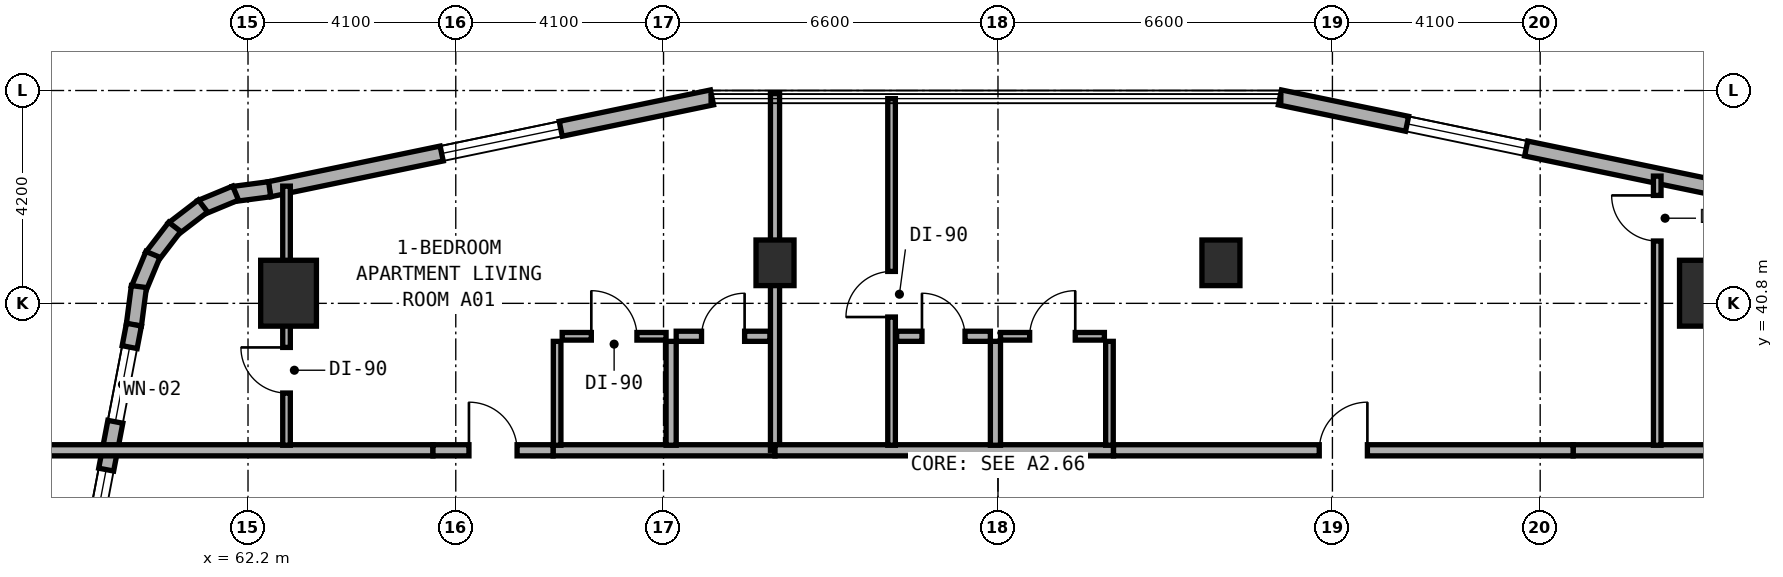
"""IFC4 building model, lengths in metres.
Left out: names, types, materials, properties, quantities, classifications, styles, units other than length and angle.
Written with IfcOpenShell. Run it as: python <this file> out.ifc"""

import sys

from ifc_helpers import new_model, si_unit, direction, frame, frame_2d, origin, origin_2d, place, context, subcontext, project, spatial, rectangle, extrude, element, fill, save


model = new_model("IFC4")
c1 = context("Model", 3, precision=1e-05, world=origin(), true_north=direction((0.0, 1.0)))
c2 = subcontext(c1, "Body", "Model", "MODEL_VIEW")
j1 = project(units=[si_unit("LENGTHUNIT", "METRE"), si_unit("PLANEANGLEUNIT", "RADIAN")], contexts=[c1])
p1 = place(None, origin())
s1 = spatial("IfcSite", under=j1, at=p1, CompositionType="ELEMENT")
p2 = place(p1, origin())
s2 = spatial("IfcBuilding", under=s1, at=p2, CompositionType="ELEMENT")
p3 = place(p2, frame((0.0, 0.0, 24.0)))
s3 = spatial("IfcBuildingStorey", under=s2, at=p3, CompositionType="ELEMENT", Elevation=24.0)
for number, where, z_axis, x_axis in (
    (1, (72.6, 41.6, 0.0), (0.0, 0.0, 1.0), (1.0, 0.0, 0.0)),
    (2, (81.4, 41.6, 0.0), (0.0, 0.0, 1.0), (1.0, 0.0, 0.0)),
):
    element("IfcColumn", number, at=place(p3, frame(where, z_axis=z_axis, x_axis=x_axis)), inside=s3, PredefinedType="COLUMN", context=c2, shape_type="SweptSolid", body=[
        extrude(rectangle(XDim=0.75, YDim=0.9, at=origin_2d()), origin(), (0.0, 0.0, 1.0), 3.5),
    ])
for number, where, z_axis, x_axis in (
    (3, (91.0, 41.0, 0.0), (0.0, 0.0, 1.0), (1.0, 0.0, 0.0)),
    (4, (63.0, 41.0, 0.0), (0.0, 0.0, 1.0), (1.0, 0.0, 0.0)),
):
    element("IfcColumn", number, at=place(p3, frame(where, z_axis=z_axis, x_axis=x_axis)), inside=s3, PredefinedType="COLUMN", context=c2, shape_type="SweptSolid", body=[
        extrude(rectangle(XDim=1.1, YDim=1.3, at=origin_2d()), origin(), (0.0, 0.0, 1.0), 3.5),
    ])
p4 = place(p3, frame((91.298, 43.051, 0.0), z_axis=(0.0, 0.0, 1.0), x_axis=(-0.979128391325, 0.203242695569, 0.0)))
e5 = element("IfcWall", 5, at=p4, inside=s3, PredefinedType="STANDARD", context=c2, shape_type="SweptSolid", body=[
    extrude(rectangle(XDim=8.92, YDim=0.3, at=frame_2d((4.46, 0.0))), origin(), (0.0, 0.0, 1.0), 3.25),
])
p5 = place(p4, frame((3.957, 0.0, 0.8)))
e6 = element("IfcOpeningElement", 6, at=p5, cuts=e5, PredefinedType="OPENING", context=c2, shape_type="SweptSolid", body=[
    extrude(rectangle(XDim=2.4, YDim=1.6, at=frame_2d((1.2, 0.8))), frame((0.0, 0.16, 0.0), z_axis=(0.0, -1.0, 0.0), x_axis=(1.0, 0.0, 0.0)), (0.0, 0.0, 1.0), 0.32),
])
p6 = place(p3, frame((71.356, 44.864, 0.0), z_axis=(0.0, 0.0, 1.0), x_axis=(-0.979127260729, -0.203248142175, 0.0)))
e7 = element("IfcWall", 7, at=p6, inside=s3, PredefinedType="STANDARD", context=c2, shape_type="SweptSolid", body=[
    extrude(rectangle(XDim=8.92, YDim=0.3, at=frame_2d((4.46, 0.0))), origin(), (0.0, 0.0, 1.0), 3.25),
])
p7 = place(p6, frame((3.048, 0.0, 0.8)))
e8 = element("IfcOpeningElement", 8, at=p7, cuts=e7, PredefinedType="OPENING", context=c2, shape_type="SweptSolid", body=[
    extrude(rectangle(XDim=2.4, YDim=1.6, at=frame_2d((1.2, 0.8))), frame((0.0, 0.16, 0.0), z_axis=(0.0, -1.0, 0.0), x_axis=(1.0, 0.0, 0.0)), (0.0, 0.0, 1.0), 0.32),
])
p8 = place(p3, frame((62.627, 43.052, 0.0), z_axis=(0.0, 0.0, 1.0), x_axis=(-0.991480488834, -0.130255288807, 0.0)))
e9 = element("IfcWall", 9, at=p8, inside=s3, PredefinedType="STANDARD", context=c2, shape_type="SweptSolid", body=[
    extrude(rectangle(XDim=0.729, YDim=0.3, at=frame_2d((0.365, 0.0))), origin(), (0.0, 0.0, 1.0), 3.25),
])
for number, where, z_axis, x_axis in (
    (10, (61.955, 42.976, 0.0), (0.0, 0.0, 1.0), (-0.924, -0.384, 0.0)),
    (11, (61.311, 42.721, 0.0), (0.0, 0.0, 1.0), (-0.794, -0.608, 0.0)),
    (12, (60.754, 42.309, 0.0), (0.0, 0.0, 1.0), (-0.608, -0.794, 0.0)),
    (13, (60.324, 41.766, 0.0), (0.0, 0.0, 1.0), (-0.383, -0.924, 0.0)),
):
    element("IfcWall", number, at=place(p3, frame(where, z_axis=z_axis, x_axis=x_axis)), inside=s3, PredefinedType="STANDARD", context=c2, shape_type="SweptSolid", body=[
        extrude(rectangle(XDim=0.746, YDim=0.3, at=frame_2d((0.373, 0.0))), origin(), (0.0, 0.0, 1.0), 3.25),
    ])
p9 = place(p3, frame((60.047, 41.131, 0.0), z_axis=(0.0, 0.0, 1.0), x_axis=(-0.129653178221, -0.991559404866, 0.0)))
e14 = element("IfcWall", 14, at=p9, inside=s3, PredefinedType="STANDARD", context=c2, shape_type="SweptSolid", body=[
    extrude(rectangle(XDim=0.764, YDim=0.3, at=frame_2d((0.382, 0.0))), origin(), (0.0, 0.0, 1.0), 3.25),
])
p10 = place(p3, frame((59.949, 40.38, 0.0), z_axis=(0.0, 0.0, 1.0), x_axis=(-0.188087874316, -0.982152203854, 0.0)))
e15 = element("IfcWall", 15, at=p10, inside=s3, PredefinedType="STANDARD", context=c2, shape_type="SweptSolid", body=[
    extrude(rectangle(XDim=9.634, YDim=0.3, at=frame_2d((4.817, 0.0))), origin(), (0.0, 0.0, 1.0), 3.25),
])
p11 = place(p10, frame((0.452, 0.0, 0.85)))
e16 = element("IfcOpeningElement", 16, at=p11, cuts=e15, PredefinedType="OPENING", context=c2, shape_type="SweptSolid", body=[
    extrude(rectangle(XDim=1.5, YDim=1.5, at=frame_2d((0.75, 0.75))), frame((0.0, 0.16, 0.0), z_axis=(0.0, -1.0, 0.0), x_axis=(1.0, 0.0, 0.0)), (0.0, 0.0, 1.0), 0.32),
])
p12 = place(p10, frame((2.913, 0.0, 0.85)))
e17 = element("IfcOpeningElement", 17, at=p12, cuts=e15, PredefinedType="OPENING", context=c2, shape_type="SweptSolid", body=[
    extrude(rectangle(XDim=1.2, YDim=1.5, at=frame_2d((0.6, 0.75))), frame((0.0, 0.16, 0.0), z_axis=(0.0, -1.0, 0.0), x_axis=(1.0, 0.0, 0.0)), (0.0, 0.0, 1.0), 0.32),
])
p13 = place(p10, frame((5.235, 0.0, 0.8)))
e18 = element("IfcOpeningElement", 18, at=p13, cuts=e15, PredefinedType="OPENING", context=c2, shape_type="SweptSolid", body=[
    extrude(rectangle(XDim=2.4, YDim=1.6, at=frame_2d((1.2, 0.8))), frame((0.0, 0.16, 0.0), z_axis=(0.0, -1.0, 0.0), x_axis=(1.0, 0.0, 0.0)), (0.0, 0.0, 1.0), 0.32),
])
p14 = place(p3, frame((58.16, 37.9, 0.0), z_axis=(0.0, 0.0, 1.0), x_axis=(1.0, 0.0, 0.0)))
e19 = element("IfcWall", 19, at=p14, inside=s3, PredefinedType="SOLIDWALL", context=c2, shape_type="SweptSolid", body=[
    extrude(rectangle(XDim=7.69, YDim=0.22, at=frame_2d((3.845, 0.0))), origin(), (0.0, 0.0, 1.0), 2.865),
])
p15 = place(p3, frame((68.22, 37.9, 0.0), z_axis=(0.0, 0.0, 1.0), x_axis=(1.0, 0.0, 0.0)))
e20 = element("IfcWall", 20, at=p15, inside=s3, PredefinedType="SOLIDWALL", context=c2, shape_type="SweptSolid", body=[
    extrude(rectangle(XDim=4.38, YDim=0.22, at=frame_2d((2.19, 0.0))), origin(), (0.0, 0.0, 1.0), 2.725),
])
p16 = place(p3, frame((65.85, 37.9, 0.0), z_axis=(0.0, 0.0, 1.0), x_axis=(1.0, 0.0, 0.0)))
e21 = element("IfcWall", 21, at=p16, inside=s3, PredefinedType="SOLIDWALL", context=c2, shape_type="SweptSolid", body=[
    extrude(rectangle(XDim=2.37, YDim=0.22, at=frame_2d((1.185, 0.0))), origin(), (0.0, 0.0, 1.0), 3.22),
])
p17 = place(p16, frame((0.71, 0.0, 0.0)))
e22 = element("IfcOpeningElement", 22, at=p17, cuts=e21, PredefinedType="OPENING", context=c2, shape_type="SweptSolid", body=[
    extrude(rectangle(XDim=0.95, YDim=2.1, at=frame_2d((0.475, 1.05))), frame((0.0, 0.12, 0.0), z_axis=(0.0, -1.0, 0.0), x_axis=(1.0, 0.0, 0.0)), (0.0, 0.0, 1.0), 0.24),
])
p18 = place(p3, frame((62.96, 38.0, 0.0), z_axis=(0.0, 0.0, 1.0), x_axis=(0.0, 1.0, 0.0)))
e23 = element("IfcWall", 23, at=p18, inside=s3, PredefinedType="PARTITIONING", context=c2, shape_type="SweptSolid", body=[
    extrude(rectangle(XDim=5.113, YDim=0.15, at=frame_2d((2.557, 0.0))), origin(), (0.0, 0.0, 1.0), 2.865),
])
p19 = place(p18, frame((1.03, 0.0, 0.0)))
e24 = element("IfcOpeningElement", 24, at=p19, cuts=e23, PredefinedType="OPENING", context=c2, shape_type="SweptSolid", body=[
    extrude(rectangle(XDim=0.9, YDim=2.1, at=frame_2d((0.45, 1.05))), frame((0.0, 0.085, 0.0), z_axis=(0.0, -1.0, 0.0), x_axis=(1.0, 0.0, 0.0)), (0.0, 0.0, 1.0), 0.17),
])
p20 = place(p3, frame((70.55, 38.0, 0.0), z_axis=(0.0, 0.0, 1.0), x_axis=(0.0, 1.0, 0.0)))
e25 = element("IfcWall", 25, at=p20, inside=s3, PredefinedType="PLUMBINGWALL", context=c2, shape_type="SweptSolid", body=[
    extrude(rectangle(XDim=2.05, YDim=0.2, at=frame_2d((1.025, 0.0))), origin(), (0.0, 0.0, 1.0), 3.22),
])
p21 = place(p3, frame((68.3, 38.0, 0.0), z_axis=(0.0, 0.0, 1.0), x_axis=(0.0, 1.0, 0.0)))
e26 = element("IfcWall", 26, at=p21, inside=s3, PredefinedType="PARTITIONING", context=c2, shape_type="SweptSolid", body=[
    extrude(rectangle(XDim=2.05, YDim=0.15, at=frame_2d((1.025, 0.0))), origin(), (0.0, 0.0, 1.0), 3.22),
])
p22 = place(p3, frame((70.65, 40.15, 0.0), z_axis=(0.0, 0.0, 1.0), x_axis=(1.0, 0.0, 0.0)))
e27 = element("IfcWall", 27, at=p22, inside=s3, PredefinedType="PLUMBINGWALL", context=c2, shape_type="SweptSolid", body=[
    extrude(rectangle(XDim=1.85, YDim=0.2, at=frame_2d((0.925, 0.0))), origin(), (0.0, 0.0, 1.0), 3.22),
])
p23 = place(p22, frame((0.5, 0.0, 0.0)))
e28 = element("IfcOpeningElement", 28, at=p23, cuts=e27, PredefinedType="OPENING", context=c2, shape_type="SweptSolid", body=[
    extrude(rectangle(XDim=0.85, YDim=2.1, at=frame_2d((0.425, 1.05))), frame((0.0, 0.11, 0.0), z_axis=(0.0, -1.0, 0.0), x_axis=(1.0, 0.0, 0.0)), (0.0, 0.0, 1.0), 0.22),
])
p24 = place(p3, frame((68.4, 40.15, 0.0), z_axis=(0.0, 0.0, 1.0), x_axis=(1.0, 0.0, 0.0)))
e29 = element("IfcWall", 29, at=p24, inside=s3, PredefinedType="PARTITIONING", context=c2, shape_type="SweptSolid", body=[
    extrude(rectangle(XDim=2.05, YDim=0.15, at=frame_2d((1.025, 0.0))), origin(), (0.0, 0.0, 1.0), 3.22),
])
p25 = place(p24, frame((0.575, 0.0, 0.0)))
e30 = element("IfcOpeningElement", 30, at=p25, cuts=e29, PredefinedType="OPENING", context=c2, shape_type="SweptSolid", body=[
    extrude(rectangle(XDim=0.9, YDim=2.1, at=frame_2d((0.45, 1.05))), frame((0.0, 0.085, 0.0), z_axis=(0.0, -1.0, 0.0), x_axis=(1.0, 0.0, 0.0)), (0.0, 0.0, 1.0), 0.17),
])
p26 = place(p3, frame((72.6, 37.9, 0.0), z_axis=(0.0, 0.0, 1.0), x_axis=(0.0, 1.0, 0.0)))
e31 = element("IfcWall", 31, at=p26, inside=s3, PredefinedType="SOLIDWALL", context=c2, shape_type="SweptSolid", body=[
    extrude(rectangle(XDim=7.04, YDim=0.18, at=frame_2d((3.52, 0.0))), origin(), (0.0, 0.0, 1.0), 2.725),
])
p27 = place(p3, frame((72.6, 37.9, 0.0), z_axis=(0.0, 0.0, 1.0), x_axis=(1.0, 0.0, 0.0)))
e32 = element("IfcWall", 32, at=p27, inside=s3, PredefinedType="SOLIDWALL", context=c2, shape_type="SweptSolid", body=[
    extrude(rectangle(XDim=6.68, YDim=0.22, at=frame_2d((3.34, 0.0))), origin(), (0.0, 0.0, 1.0), 2.725),
])
p28 = place(p3, frame((88.35, 37.9, 0.0), z_axis=(0.0, 0.0, 1.0), x_axis=(1.0, 0.0, 0.0)))
e33 = element("IfcWall", 33, at=p28, inside=s3, PredefinedType="SOLIDWALL", context=c2, shape_type="SweptSolid", body=[
    extrude(rectangle(XDim=7.41, YDim=0.22, at=frame_2d((3.705, 0.0))), origin(), (0.0, 0.0, 1.0), 2.865),
])
p29 = place(p3, frame((79.28, 37.9, 0.0), z_axis=(0.0, 0.0, 1.0), x_axis=(1.0, 0.0, 0.0)))
e34 = element("IfcWall", 34, at=p29, inside=s3, PredefinedType="SOLIDWALL", context=c2, shape_type="SweptSolid", body=[
    extrude(rectangle(XDim=9.07, YDim=0.22, at=frame_2d((4.535, 0.0))), origin(), (0.0, 0.0, 1.0), 2.725),
])
p30 = place(p29, frame((4.06, 0.0, 0.0)))
e35 = element("IfcOpeningElement", 35, at=p30, cuts=e34, PredefinedType="OPENING", context=c2, shape_type="SweptSolid", body=[
    extrude(rectangle(XDim=0.95, YDim=2.1, at=frame_2d((0.475, 1.05))), frame((0.0, 0.12, 0.0), z_axis=(0.0, -1.0, 0.0), x_axis=(1.0, 0.0, 0.0)), (0.0, 0.0, 1.0), 0.24),
])
p31 = place(p3, frame((74.9, 38.0, 0.0), z_axis=(0.0, 0.0, 1.0), x_axis=(0.0, 1.0, 0.0)))
e36 = element("IfcWall", 36, at=p31, inside=s3, PredefinedType="PARTITIONING", context=c2, shape_type="SweptSolid", body=[
    extrude(rectangle(XDim=6.84, YDim=0.15, at=frame_2d((3.42, 0.0))), origin(), (0.0, 0.0, 1.0), 2.865),
])
p32 = place(p31, frame((2.53, 0.0, 0.0)))
e37 = element("IfcOpeningElement", 37, at=p32, cuts=e36, PredefinedType="OPENING", context=c2, shape_type="SweptSolid", body=[
    extrude(rectangle(XDim=0.9, YDim=2.1, at=frame_2d((0.45, 1.05))), frame((0.0, 0.085, 0.0), z_axis=(0.0, -1.0, 0.0), x_axis=(1.0, 0.0, 0.0)), (0.0, 0.0, 1.0), 0.17),
])
p33 = place(p3, frame((90.01, 38.0, 0.0), z_axis=(0.0, 0.0, 1.0), x_axis=(0.0, 1.0, 0.0)))
e38 = element("IfcWall", 38, at=p33, inside=s3, PredefinedType="PARTITIONING", context=c2, shape_type="SweptSolid", body=[
    extrude(rectangle(XDim=5.311, YDim=0.15, at=frame_2d((2.656, 0.0))), origin(), (0.0, 0.0, 1.0), 2.865),
])
p34 = place(p33, frame((4.03, 0.0, 0.0)))
e39 = element("IfcOpeningElement", 39, at=p34, cuts=e38, PredefinedType="OPENING", context=c2, shape_type="SweptSolid", body=[
    extrude(rectangle(XDim=0.9, YDim=2.1, at=frame_2d((0.45, 1.05))), frame((0.0, 0.085, 0.0), z_axis=(0.0, -1.0, 0.0), x_axis=(1.0, 0.0, 0.0)), (0.0, 0.0, 1.0), 0.17),
])
p35 = place(p3, frame((76.95, 38.0, 0.0), z_axis=(0.0, 0.0, 1.0), x_axis=(0.0, 1.0, 0.0)))
e40 = element("IfcWall", 40, at=p35, inside=s3, PredefinedType="PLUMBINGWALL", context=c2, shape_type="SweptSolid", body=[
    extrude(rectangle(XDim=2.05, YDim=0.2, at=frame_2d((1.025, 0.0))), origin(), (0.0, 0.0, 1.0), 2.985),
])
p36 = place(p3, frame((79.2, 38.0, 0.0), z_axis=(0.0, 0.0, 1.0), x_axis=(0.0, 1.0, 0.0)))
e41 = element("IfcWall", 41, at=p36, inside=s3, PredefinedType="PARTITIONING", context=c2, shape_type="SweptSolid", body=[
    extrude(rectangle(XDim=2.05, YDim=0.15, at=frame_2d((1.025, 0.0))), origin(), (0.0, 0.0, 1.0), 2.985),
])
p37 = place(p3, frame((75.0, 40.15, 0.0), z_axis=(0.0, 0.0, 1.0), x_axis=(1.0, 0.0, 0.0)))
e42 = element("IfcWall", 42, at=p37, inside=s3, PredefinedType="PLUMBINGWALL", context=c2, shape_type="SweptSolid", body=[
    extrude(rectangle(XDim=1.85, YDim=0.2, at=frame_2d((0.925, 0.0))), origin(), (0.0, 0.0, 1.0), 3.22),
])
p38 = place(p37, frame((0.5, 0.0, 0.0)))
e43 = element("IfcOpeningElement", 43, at=p38, cuts=e42, PredefinedType="OPENING", context=c2, shape_type="SweptSolid", body=[
    extrude(rectangle(XDim=0.85, YDim=2.1, at=frame_2d((0.425, 1.05))), frame((0.0, 0.11, 0.0), z_axis=(0.0, -1.0, 0.0), x_axis=(1.0, 0.0, 0.0)), (0.0, 0.0, 1.0), 0.22),
])
p39 = place(p3, frame((77.05, 40.15, 0.0), z_axis=(0.0, 0.0, 1.0), x_axis=(1.0, 0.0, 0.0)))
e44 = element("IfcWall", 44, at=p39, inside=s3, PredefinedType="PARTITIONING", context=c2, shape_type="SweptSolid", body=[
    extrude(rectangle(XDim=2.05, YDim=0.15, at=frame_2d((1.025, 0.0))), origin(), (0.0, 0.0, 1.0), 3.22),
])
p40 = place(p39, frame((0.575, 0.0, 0.0)))
e45 = element("IfcOpeningElement", 45, at=p40, cuts=e44, PredefinedType="OPENING", context=c2, shape_type="SweptSolid", body=[
    extrude(rectangle(XDim=0.9, YDim=2.1, at=frame_2d((0.45, 1.05))), frame((0.0, 0.085, 0.0), z_axis=(0.0, -1.0, 0.0), x_axis=(1.0, 0.0, 0.0)), (0.0, 0.0, 1.0), 0.17),
])
p41 = place(p5, origin())
e46 = element("IfcWindow", 46, at=p41, inside=s3, PartitioningType="SINGLE_PANEL", PredefinedType="WINDOW", context=c2, shape_type="SweptSolid", body=[
    extrude(rectangle(XDim=2.4, YDim=1.6, at=frame_2d((1.2, 0.8))), frame((0.0, 0.03, 0.0), z_axis=(0.0, -1.0, 0.0), x_axis=(1.0, 0.0, 0.0)), (0.0, 0.0, 1.0), 0.06),
])
fill(e6, e46)
p42 = place(p7, origin())
e47 = element("IfcWindow", 47, at=p42, inside=s3, PartitioningType="SINGLE_PANEL", PredefinedType="WINDOW", context=c2, shape_type="SweptSolid", body=[
    extrude(rectangle(XDim=2.4, YDim=1.6, at=frame_2d((1.2, 0.8))), frame((0.0, 0.03, 0.0), z_axis=(0.0, -1.0, 0.0), x_axis=(1.0, 0.0, 0.0)), (0.0, 0.0, 1.0), 0.06),
])
fill(e8, e47)
p43 = place(p11, origin())
e48 = element("IfcWindow", 48, at=p43, inside=s3, PartitioningType="SINGLE_PANEL", PredefinedType="WINDOW", context=c2, shape_type="SweptSolid", body=[
    extrude(rectangle(XDim=1.5, YDim=1.5, at=frame_2d((0.75, 0.75))), frame((0.0, 0.03, 0.0), z_axis=(0.0, -1.0, 0.0), x_axis=(1.0, 0.0, 0.0)), (0.0, 0.0, 1.0), 0.06),
])
fill(e16, e48)
p44 = place(p12, origin())
e49 = element("IfcWindow", 49, at=p44, inside=s3, PartitioningType="SINGLE_PANEL", PredefinedType="WINDOW", context=c2, shape_type="SweptSolid", body=[
    extrude(rectangle(XDim=1.2, YDim=1.5, at=frame_2d((0.6, 0.75))), frame((0.0, 0.03, 0.0), z_axis=(0.0, -1.0, 0.0), x_axis=(1.0, 0.0, 0.0)), (0.0, 0.0, 1.0), 0.06),
])
fill(e17, e49)
p45 = place(p17, origin())
e50 = element("IfcDoor", 50, at=p45, inside=s3, OperationType="SINGLE_SWING_LEFT", PredefinedType="DOOR", context=c2, shape_type="SweptSolid", body=[
    extrude(rectangle(XDim=0.95, YDim=2.1, at=frame_2d((0.475, 1.05))), frame((0.0, 0.025, 0.0), z_axis=(0.0, -1.0, 0.0), x_axis=(1.0, 0.0, 0.0)), (0.0, 0.0, 1.0), 0.05),
])
fill(e22, e50)
p46 = place(p19, origin())
e51 = element("IfcDoor", 51, at=p46, inside=s3, OperationType="SINGLE_SWING_RIGHT", PredefinedType="DOOR", context=c2, shape_type="SweptSolid", body=[
    extrude(rectangle(XDim=0.9, YDim=2.1, at=frame_2d((0.45, 1.05))), frame((0.0, 0.025, 0.0), z_axis=(0.0, -1.0, 0.0), x_axis=(1.0, 0.0, 0.0)), (0.0, 0.0, 1.0), 0.05),
])
fill(e24, e51)
p47 = place(p23, origin())
e52 = element("IfcDoor", 52, at=p47, inside=s3, OperationType="SINGLE_SWING_RIGHT", PredefinedType="DOOR", context=c2, shape_type="SweptSolid", body=[
    extrude(rectangle(XDim=0.85, YDim=2.1, at=frame_2d((0.425, 1.05))), frame((0.0, 0.025, 0.0), z_axis=(0.0, -1.0, 0.0), x_axis=(1.0, 0.0, 0.0)), (0.0, 0.0, 1.0), 0.05),
])
fill(e28, e52)
p48 = place(p25, origin())
e53 = element("IfcDoor", 53, at=p48, inside=s3, OperationType="SINGLE_SWING_LEFT", PredefinedType="DOOR", context=c2, shape_type="SweptSolid", body=[
    extrude(rectangle(XDim=0.9, YDim=2.1, at=frame_2d((0.45, 1.05))), frame((0.0, 0.025, 0.0), z_axis=(0.0, -1.0, 0.0), x_axis=(1.0, 0.0, 0.0)), (0.0, 0.0, 1.0), 0.05),
])
fill(e30, e53)
p49 = place(p30, origin())
e54 = element("IfcDoor", 54, at=p49, inside=s3, OperationType="SINGLE_SWING_RIGHT", PredefinedType="DOOR", context=c2, shape_type="SweptSolid", body=[
    extrude(rectangle(XDim=0.95, YDim=2.1, at=frame_2d((0.475, 1.05))), frame((0.0, 0.025, 0.0), z_axis=(0.0, -1.0, 0.0), x_axis=(1.0, 0.0, 0.0)), (0.0, 0.0, 1.0), 0.05),
])
fill(e35, e54)
p50 = place(p32, origin())
e55 = element("IfcDoor", 55, at=p50, inside=s3, OperationType="SINGLE_SWING_LEFT", PredefinedType="DOOR", context=c2, shape_type="SweptSolid", body=[
    extrude(rectangle(XDim=0.9, YDim=2.1, at=frame_2d((0.45, 1.05))), frame((0.0, 0.025, 0.0), z_axis=(0.0, -1.0, 0.0), x_axis=(1.0, 0.0, 0.0)), (0.0, 0.0, 1.0), 0.05),
])
fill(e37, e55)
p51 = place(p34, origin())
e56 = element("IfcDoor", 56, at=p51, inside=s3, OperationType="SINGLE_SWING_RIGHT", PredefinedType="DOOR", context=c2, shape_type="SweptSolid", body=[
    extrude(rectangle(XDim=0.9, YDim=2.1, at=frame_2d((0.45, 1.05))), frame((0.0, 0.025, 0.0), z_axis=(0.0, -1.0, 0.0), x_axis=(1.0, 0.0, 0.0)), (0.0, 0.0, 1.0), 0.05),
])
fill(e39, e56)
p52 = place(p38, origin())
e57 = element("IfcDoor", 57, at=p52, inside=s3, OperationType="SINGLE_SWING_LEFT", PredefinedType="DOOR", context=c2, shape_type="SweptSolid", body=[
    extrude(rectangle(XDim=0.85, YDim=2.1, at=frame_2d((0.425, 1.05))), frame((0.0, 0.025, 0.0), z_axis=(0.0, -1.0, 0.0), x_axis=(1.0, 0.0, 0.0)), (0.0, 0.0, 1.0), 0.05),
])
fill(e43, e57)
p53 = place(p40, origin())
e58 = element("IfcDoor", 58, at=p53, inside=s3, OperationType="SINGLE_SWING_RIGHT", PredefinedType="DOOR", context=c2, shape_type="SweptSolid", body=[
    extrude(rectangle(XDim=0.9, YDim=2.1, at=frame_2d((0.45, 1.05))), frame((0.0, 0.025, 0.0), z_axis=(0.0, -1.0, 0.0), x_axis=(1.0, 0.0, 0.0)), (0.0, 0.0, 1.0), 0.05),
])
fill(e45, e58)
save(model, sys.argv[1])
